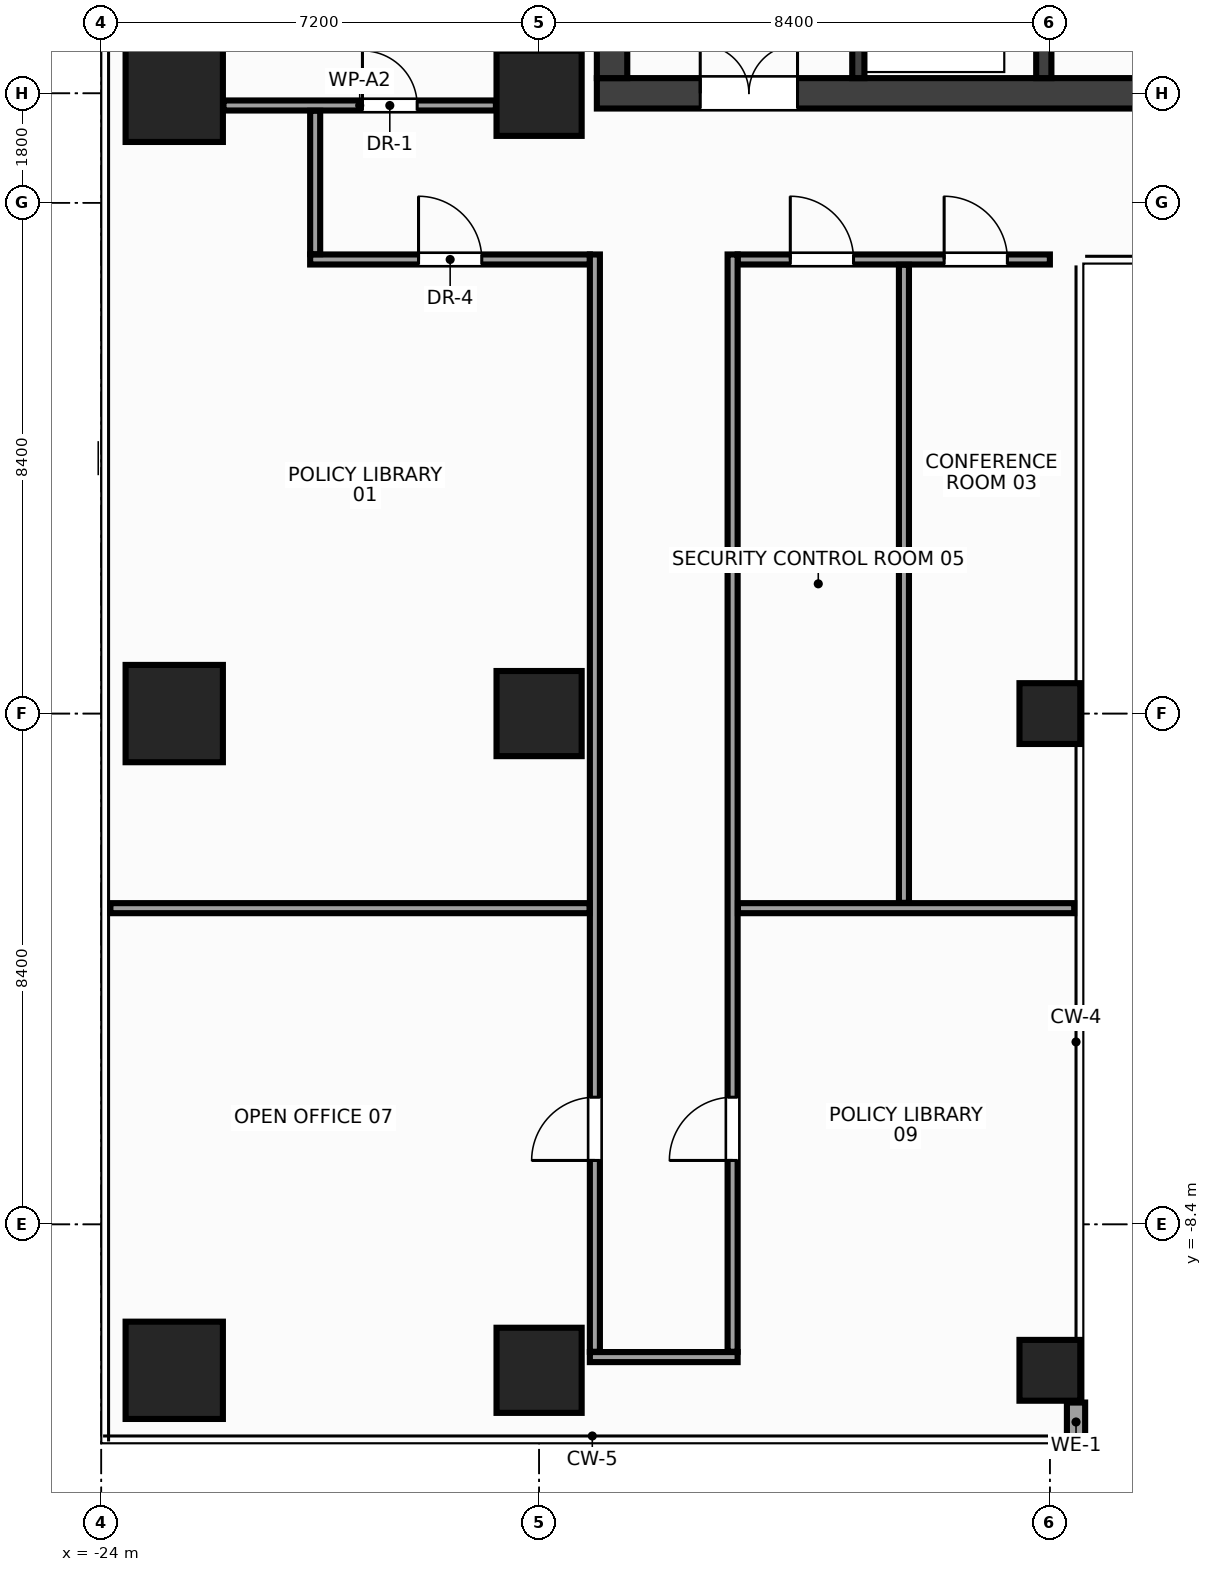
"""IFC4 building model, lengths in metres.
Left out: names, types, materials, properties, quantities, classifications, styles, units other than length and angle.
Written with IfcOpenShell. Run it as: python <this file> out.ifc"""

import sys

from ifc_helpers import new_model, si_unit, direction, frame, frame_2d, origin, origin_2d, place, context, subcontext, project, spatial, rectangle, hollow_rectangle, extrude, source, transform, mapped, element, fill, save


model = new_model("IFC4")
c1 = context("Model", 3, precision=1e-05, world=origin(), true_north=direction((0.0, 1.0)))
c2 = subcontext(c1, "Body", "Model", "MODEL_VIEW")
j1 = project(units=[si_unit("LENGTHUNIT", "METRE"), si_unit("PLANEANGLEUNIT", "RADIAN")], contexts=[c1])
p1 = place(None, origin())
s1 = spatial("IfcSite", under=j1, at=p1, CompositionType="ELEMENT")
p2 = place(p1, origin())
s2 = spatial("IfcBuilding", under=s1, at=p2, CompositionType="ELEMENT")
p3 = place(p2, frame((0.0, 0.0, 218.0)))
s3 = spatial("IfcBuildingStorey", under=s2, at=p3, CompositionType="ELEMENT", Elevation=218.0)
m1 = source(origin(), c2, "Body", "SweptSolid", [
    extrude(rectangle(XDim=31.7, YDim=0.5, at=frame_2d((15.85, 0.0))), origin(), (0.0, 0.0, 1.0), 3.6),
])
p4 = place(p3, frame((-15.85, 10.2, 0.0), z_axis=(0.0, 0.0, 1.0), x_axis=(1.0, 0.0, 0.0)))
e1 = element("IfcWall", 1, at=p4, inside=s3, PredefinedType="SHEAR", context=c2, shape_type="MappedRepresentation", body=[
    mapped(m1, transform((0.0, 0.0, 0.0), x_axis=(1.0, 0.0, 0.0), y_axis=(0.0, 1.0, 0.0), z_axis=(0.0, 0.0, 1.0), scale=1.0)),
])
p5 = place(p4, frame((1.7, 0.0, 0.0)))
e2 = element("IfcOpeningElement", 2, at=p5, cuts=e1, PredefinedType="OPENING", context=c2, shape_type="SweptSolid", body=[
    extrude(rectangle(XDim=1.6, YDim=2.15, at=frame_2d((0.8, 1.075))), frame((0.0, 0.262, 0.0), z_axis=(0.0, -1.0, 0.0), x_axis=(1.0, 0.0, 0.0)), (0.0, 0.0, 1.0), 0.524),
])
p6 = place(p4, frame((28.4, 0.0, 0.0)))
e3 = element("IfcOpeningElement", 3, at=p6, cuts=e1, PredefinedType="OPENING", context=c2, shape_type="SweptSolid", body=[
    extrude(rectangle(XDim=1.6, YDim=2.15, at=frame_2d((0.8, 1.075))), frame((0.0, 0.262, 0.0), z_axis=(0.0, -1.0, 0.0), x_axis=(1.0, 0.0, 0.0)), (0.0, 0.0, 1.0), 0.524),
])
p7 = place(p4, frame((15.1, 0.0, 0.0)))
e4 = element("IfcOpeningElement", 4, at=p7, cuts=e1, PredefinedType="OPENING", context=c2, shape_type="SweptSolid", body=[
    extrude(rectangle(XDim=1.5, YDim=2.2, at=frame_2d((0.75, 1.1))), frame((0.0, 0.262, 0.0), z_axis=(0.0, -1.0, 0.0), x_axis=(1.0, 0.0, 0.0)), (0.0, 0.0, 1.0), 0.524),
])
m2 = source(origin(), c2, "Body", "SweptSolid", [
    extrude(rectangle(XDim=13.1, YDim=0.5, at=frame_2d((6.55, 0.0))), origin(), (0.0, 0.0, 1.0), 3.6),
])
p8 = place(p3, frame((-15.6, 10.45, 0.0), z_axis=(0.0, 0.0, 1.0), x_axis=(0.0, 1.0, 0.0)))
e5 = element("IfcWall", 5, at=p8, inside=s3, PredefinedType="SHEAR", context=c2, shape_type="MappedRepresentation", body=[
    mapped(m2, transform((0.0, 0.0, 0.0), x_axis=(1.0, 0.0, 0.0), y_axis=(0.0, 1.0, 0.0), z_axis=(0.0, 0.0, 1.0), scale=1.0)),
])
m3 = source(origin(), c2, "Body", "SweptSolid", [
    extrude(rectangle(XDim=13.1, YDim=0.25, at=frame_2d((6.55, 0.0))), origin(), (0.0, 0.0, 1.0), 3.6),
])
p9 = place(p3, frame((-8.5, 10.45, 0.0), z_axis=(0.0, 0.0, 1.0), x_axis=(0.0, 1.0, 0.0)))
e6 = element("IfcWall", 6, at=p9, inside=s3, PredefinedType="SHEAR", context=c2, shape_type="MappedRepresentation", body=[
    mapped(m3, transform((0.0, 0.0, 0.0), x_axis=(1.0, 0.0, 0.0), y_axis=(0.0, 1.0, 0.0), z_axis=(0.0, 0.0, 1.0), scale=1.0)),
])
p10 = place(p9, frame((4.22, 0.0, 0.0)))
e7 = element("IfcOpeningElement", 7, at=p10, cuts=e6, PredefinedType="OPENING", context=c2, shape_type="SweptSolid", body=[
    extrude(rectangle(XDim=1.1, YDim=2.15, at=frame_2d((0.55, 1.075))), frame((0.0, 0.137, 0.0), z_axis=(0.0, -1.0, 0.0), x_axis=(1.0, 0.0, 0.0)), (0.0, 0.0, 1.0), 0.274),
])
p11 = place(p9, frame((6.14, 0.0, 0.0)))
e8 = element("IfcOpeningElement", 8, at=p11, cuts=e6, PredefinedType="OPENING", context=c2, shape_type="SweptSolid", body=[
    extrude(rectangle(XDim=1.1, YDim=2.15, at=frame_2d((0.55, 1.075))), frame((0.0, 0.137, 0.0), z_axis=(0.0, -1.0, 0.0), x_axis=(1.0, 0.0, 0.0)), (0.0, 0.0, 1.0), 0.274),
])
p12 = place(p9, frame((8.06, 0.0, 0.0)))
e9 = element("IfcOpeningElement", 9, at=p12, cuts=e6, PredefinedType="OPENING", context=c2, shape_type="SweptSolid", body=[
    extrude(rectangle(XDim=1.1, YDim=2.15, at=frame_2d((0.55, 1.075))), frame((0.0, 0.137, 0.0), z_axis=(0.0, -1.0, 0.0), x_axis=(1.0, 0.0, 0.0)), (0.0, 0.0, 1.0), 0.274),
])
m4 = source(origin(), c2, "Body", "SweptSolid", [
    extrude(rectangle(XDim=3.2, YDim=0.2, at=frame_2d((1.6, 0.0))), origin(), (0.0, 0.0, 1.0), 3.6),
])
p13 = place(p3, frame((-11.55, 10.45, 0.0), z_axis=(0.0, 0.0, 1.0), x_axis=(0.0, 1.0, 0.0)))
e10 = element("IfcWall", 10, at=p13, inside=s3, PredefinedType="SHEAR", context=c2, shape_type="MappedRepresentation", body=[
    mapped(m4, transform((0.0, 0.0, 0.0), x_axis=(1.0, 0.0, 0.0), y_axis=(0.0, 1.0, 0.0), z_axis=(0.0, 0.0, 1.0), scale=1.0)),
])
p14 = place(p13, frame((0.9, 0.0, 0.0)))
e11 = element("IfcOpeningElement", 11, at=p14, cuts=e10, PredefinedType="OPENING", context=c2, shape_type="SweptSolid", body=[
    extrude(rectangle(XDim=1.1, YDim=2.15, at=frame_2d((0.55, 1.075))), frame((0.0, 0.112, 0.0), z_axis=(0.0, -1.0, 0.0), x_axis=(1.0, 0.0, 0.0)), (0.0, 0.0, 1.0), 0.224),
])
m5 = source(origin(), c2, "Body", "SweptSolid", [
    extrude(rectangle(XDim=1.4, YDim=1.4, at=origin_2d()), origin(), (0.0, 0.0, 1.0), 3.6),
])
for number, where, z_axis, x_axis in (
    (12, (-16.8, -10.8, 0.0), (0.0, 0.0, 1.0), (1.0, 0.0, 0.0)),
    (13, (-16.8, 0.0, 0.0), (0.0, 0.0, 1.0), (1.0, 0.0, 0.0)),
    (14, (-16.8, 10.2, 0.0), (0.0, 0.0, 1.0), (1.0, 0.0, 0.0)),
):
    element("IfcColumn", number, at=place(p3, frame(where, z_axis=z_axis, x_axis=x_axis)), inside=s3, PredefinedType="COLUMN", context=c2, shape_type="MappedRepresentation", body=[
        mapped(m5, transform((0.0, 0.0, 0.0), x_axis=(1.0, 0.0, 0.0), y_axis=(0.0, 1.0, 0.0), z_axis=(0.0, 0.0, 1.0), scale=1.0)),
    ])
m6 = source(origin(), c2, "Body", "SweptSolid", [
    extrude(rectangle(XDim=1.6, YDim=1.6, at=origin_2d()), origin(), (0.0, 0.0, 1.0), 3.6),
])
for number, where, z_axis, x_axis in (
    (15, (-22.8, -10.8, 0.0), (0.0, 0.0, 1.0), (1.0, 0.0, 0.0)),
    (16, (-22.8, 0.0, 0.0), (0.0, 0.0, 1.0), (1.0, 0.0, 0.0)),
    (17, (-22.8, 10.2, 0.0), (0.0, 0.0, 1.0), (1.0, 0.0, 0.0)),
):
    element("IfcColumn", number, at=place(p3, frame(where, z_axis=z_axis, x_axis=x_axis)), inside=s3, PredefinedType="COLUMN", context=c2, shape_type="MappedRepresentation", body=[
        mapped(m6, transform((0.0, 0.0, 0.0), x_axis=(1.0, 0.0, 0.0), y_axis=(0.0, 1.0, 0.0), z_axis=(0.0, 0.0, 1.0), scale=1.0)),
    ])
m7 = source(origin(), c2, "Body", "SweptSolid", [
    extrude(hollow_rectangle(XDim=1.0, YDim=1.0, WallThickness=0.045, at=origin_2d()), origin(), (0.0, 0.0, 1.0), 3.6),
])
for number, where, z_axis, x_axis in (
    (18, (-8.4, 0.0, 0.0), (0.0, 0.0, 1.0), (1.0, 0.0, 0.0)),
    (19, (-8.4, -10.8, 0.0), (0.0, 0.0, 1.0), (1.0, 0.0, 0.0)),
):
    element("IfcColumn", number, at=place(p3, frame(where, z_axis=z_axis, x_axis=x_axis)), inside=s3, PredefinedType="COLUMN", context=c2, shape_type="MappedRepresentation", body=[
        mapped(m7, transform((0.0, 0.0, 0.0), x_axis=(1.0, 0.0, 0.0), y_axis=(0.0, 1.0, 0.0), z_axis=(0.0, 0.0, 1.0), scale=1.0)),
    ])
m8 = source(origin(), c2, "Body", "SweptSolid", [
    extrude(rectangle(XDim=0.64, YDim=0.24, at=frame_2d((0.32, 0.0))), origin(), (0.0, 0.0, 1.0), 2.76),
])
p15 = place(p3, frame((-7.97, -11.97, 0.0), z_axis=(0.0, 0.0, 1.0), x_axis=(0.0, 1.0, 0.0)))
e20 = element("IfcWall", 20, at=p15, inside=s3, PredefinedType="STANDARD", context=c2, shape_type="MappedRepresentation", body=[
    mapped(m8, transform((0.0, 0.0, 0.0), x_axis=(1.0, 0.0, 0.0), y_axis=(0.0, 1.0, 0.0), z_axis=(0.0, 0.0, 1.0), scale=1.0)),
])
m9 = source(origin(), c2, "Body", "SweptSolid", [
    extrude(rectangle(XDim=4.48, YDim=0.165, at=frame_2d((2.24, 0.0))), origin(), (0.0, 0.0, 1.0), 2.915),
])
p16 = place(p3, frame((-21.99, 10.0, 0.0), z_axis=(0.0, 0.0, 1.0), x_axis=(1.0, 0.0, 0.0)))
e21 = element("IfcWall", 21, at=p16, inside=s3, PredefinedType="PARTITIONING", context=c2, shape_type="MappedRepresentation", body=[
    mapped(m9, transform((0.0, 0.0, 0.0), x_axis=(1.0, 0.0, 0.0), y_axis=(0.0, 1.0, 0.0), z_axis=(0.0, 0.0, 1.0), scale=1.0)),
])
p17 = place(p16, frame((2.285, 0.0, 0.0)))
e22 = element("IfcOpeningElement", 22, at=p17, cuts=e21, PredefinedType="OPENING", context=c2, shape_type="SweptSolid", body=[
    extrude(rectangle(XDim=0.9, YDim=2.15, at=frame_2d((0.45, 1.075))), frame((0.0, 0.094, 0.0), z_axis=(0.0, -1.0, 0.0), x_axis=(1.0, 0.0, 0.0)), (0.0, 0.0, 1.0), 0.189),
])
m10 = source(origin(), c2, "Body", "SweptSolid", [
    extrude(rectangle(XDim=4.6, YDim=0.165, at=frame_2d((2.3, 0.0))), origin(), (0.0, 0.0, 1.0), 2.765),
])
p18 = place(p3, frame((-20.565, 7.468, 0.0), z_axis=(0.0, 0.0, 1.0), x_axis=(1.0, 0.0, 0.0)))
e23 = element("IfcWall", 23, at=p18, inside=s3, PredefinedType="PARTITIONING", context=c2, shape_type="MappedRepresentation", body=[
    mapped(m10, transform((0.0, 0.0, 0.0), x_axis=(1.0, 0.0, 0.0), y_axis=(0.0, 1.0, 0.0), z_axis=(0.0, 0.0, 1.0), scale=1.0)),
])
p19 = place(p18, frame((1.782, 0.0, 0.0)))
e24 = element("IfcOpeningElement", 24, at=p19, cuts=e23, PredefinedType="OPENING", context=c2, shape_type="SweptSolid", body=[
    extrude(rectangle(XDim=1.04, YDim=2.2, at=frame_2d((0.52, 1.1))), frame((0.0, 0.094, 0.0), z_axis=(0.0, -1.0, 0.0), x_axis=(1.0, 0.0, 0.0)), (0.0, 0.0, 1.0), 0.189),
])
m11 = source(origin(), c2, "Body", "SweptSolid", [
    extrude(rectangle(XDim=5.135, YDim=0.165, at=frame_2d((2.567, 0.0))), origin(), (0.0, 0.0, 1.0), 3.38),
])
p20 = place(p3, frame((-13.535, 7.468, 0.0), z_axis=(0.0, 0.0, 1.0), x_axis=(1.0, 0.0, 0.0)))
e25 = element("IfcWall", 25, at=p20, inside=s3, PredefinedType="PARTITIONING", context=c2, shape_type="MappedRepresentation", body=[
    mapped(m11, transform((0.0, 0.0, 0.0), x_axis=(1.0, 0.0, 0.0), y_axis=(0.0, 1.0, 0.0), z_axis=(0.0, 0.0, 1.0), scale=1.0)),
])
p21 = place(p20, frame((3.396, 0.0, 0.0)))
e26 = element("IfcOpeningElement", 26, at=p21, cuts=e25, PredefinedType="OPENING", context=c2, shape_type="SweptSolid", body=[
    extrude(rectangle(XDim=1.04, YDim=2.2, at=frame_2d((0.52, 1.1))), frame((0.0, 0.094, 0.0), z_axis=(0.0, -1.0, 0.0), x_axis=(1.0, 0.0, 0.0)), (0.0, 0.0, 1.0), 0.189),
])
p22 = place(p20, frame((0.866, 0.0, 0.0)))
e27 = element("IfcOpeningElement", 27, at=p22, cuts=e25, PredefinedType="OPENING", context=c2, shape_type="SweptSolid", body=[
    extrude(rectangle(XDim=1.04, YDim=2.2, at=frame_2d((0.52, 1.1))), frame((0.0, 0.094, 0.0), z_axis=(0.0, -1.0, 0.0), x_axis=(1.0, 0.0, 0.0)), (0.0, 0.0, 1.0), 0.189),
])
m12 = source(origin(), c2, "Body", "SweptSolid", [
    extrude(rectangle(XDim=2.43, YDim=0.165, at=frame_2d((1.215, 0.0))), origin(), (0.0, 0.0, 1.0), 2.915),
])
p23 = place(p3, frame((-15.965, -10.583, 0.0), z_axis=(0.0, 0.0, 1.0), x_axis=(1.0, 0.0, 0.0)))
e28 = element("IfcWall", 28, at=p23, inside=s3, PredefinedType="PARTITIONING", context=c2, shape_type="MappedRepresentation", body=[
    mapped(m12, transform((0.0, 0.0, 0.0), x_axis=(1.0, 0.0, 0.0), y_axis=(0.0, 1.0, 0.0), z_axis=(0.0, 0.0, 1.0), scale=1.0)),
])
m13 = source(origin(), c2, "Body", "SweptSolid", [
    extrude(rectangle(XDim=2.358, YDim=0.165, at=frame_2d((1.179, 0.0))), origin(), (0.0, 0.0, 1.0), 3.38),
])
p24 = place(p3, frame((-20.482, 7.555, 0.0), z_axis=(0.0, 0.0, 1.0), x_axis=(0.0, 1.0, 0.0)))
e29 = element("IfcWall", 29, at=p24, inside=s3, PredefinedType="PARTITIONING", context=c2, shape_type="MappedRepresentation", body=[
    mapped(m13, transform((0.0, 0.0, 0.0), x_axis=(1.0, 0.0, 0.0), y_axis=(0.0, 1.0, 0.0), z_axis=(0.0, 0.0, 1.0), scale=1.0)),
])
m14 = source(origin(), c2, "Body", "SweptSolid", [
    extrude(rectangle(XDim=18.045, YDim=0.165, at=frame_2d((9.022, 0.0))), origin(), (0.0, 0.0, 1.0), 2.915),
])
p25 = place(p3, frame((-15.883, -10.495, 0.0), z_axis=(0.0, 0.0, 1.0), x_axis=(0.0, 1.0, 0.0)))
e30 = element("IfcWall", 30, at=p25, inside=s3, PredefinedType="PARTITIONING", context=c2, shape_type="MappedRepresentation", body=[
    mapped(m14, transform((0.0, 0.0, 0.0), x_axis=(1.0, 0.0, 0.0), y_axis=(0.0, 1.0, 0.0), z_axis=(0.0, 0.0, 1.0), scale=1.0)),
])
p26 = place(p25, frame((3.146, 0.0, 0.0)))
e31 = element("IfcOpeningElement", 31, at=p26, cuts=e30, PredefinedType="OPENING", context=c2, shape_type="SweptSolid", body=[
    extrude(rectangle(XDim=1.04, YDim=2.2, at=frame_2d((0.52, 1.1))), frame((0.0, 0.094, 0.0), z_axis=(0.0, -1.0, 0.0), x_axis=(1.0, 0.0, 0.0)), (0.0, 0.0, 1.0), 0.189),
])
p27 = place(p3, frame((-13.617, -10.495, 0.0), z_axis=(0.0, 0.0, 1.0), x_axis=(0.0, 1.0, 0.0)))
e32 = element("IfcWall", 32, at=p27, inside=s3, PredefinedType="PARTITIONING", context=c2, shape_type="MappedRepresentation", body=[
    mapped(m14, transform((0.0, 0.0, 0.0), x_axis=(1.0, 0.0, 0.0), y_axis=(0.0, 1.0, 0.0), z_axis=(0.0, 0.0, 1.0), scale=1.0)),
])
p28 = place(p27, frame((3.146, 0.0, 0.0)))
e33 = element("IfcOpeningElement", 33, at=p28, cuts=e32, PredefinedType="OPENING", context=c2, shape_type="SweptSolid", body=[
    extrude(rectangle(XDim=1.04, YDim=2.2, at=frame_2d((0.52, 1.1))), frame((0.0, 0.094, 0.0), z_axis=(0.0, -1.0, 0.0), x_axis=(1.0, 0.0, 0.0)), (0.0, 0.0, 1.0), 0.189),
])
m15 = source(origin(), c2, "Body", "SweptSolid", [
    extrude(rectangle(XDim=7.88, YDim=0.165, at=frame_2d((3.94, 0.0))), origin(), (0.0, 0.0, 1.0), 2.765),
])
p29 = place(p3, frame((-23.85, -3.2, 0.0), z_axis=(0.0, 0.0, 1.0), x_axis=(1.0, 0.0, 0.0)))
e34 = element("IfcWall", 34, at=p29, inside=s3, PredefinedType="PARTITIONING", context=c2, shape_type="MappedRepresentation", body=[
    mapped(m15, transform((0.0, 0.0, 0.0), x_axis=(1.0, 0.0, 0.0), y_axis=(0.0, 1.0, 0.0), z_axis=(0.0, 0.0, 1.0), scale=1.0)),
])
m16 = source(origin(), c2, "Body", "SweptSolid", [
    extrude(rectangle(XDim=5.53, YDim=0.165, at=frame_2d((2.765, 0.0))), origin(), (0.0, 0.0, 1.0), 2.765),
])
p30 = place(p3, frame((-13.53, -3.2, 0.0), z_axis=(0.0, 0.0, 1.0), x_axis=(1.0, 0.0, 0.0)))
e35 = element("IfcWall", 35, at=p30, inside=s3, PredefinedType="PARTITIONING", context=c2, shape_type="MappedRepresentation", body=[
    mapped(m16, transform((0.0, 0.0, 0.0), x_axis=(1.0, 0.0, 0.0), y_axis=(0.0, 1.0, 0.0), z_axis=(0.0, 0.0, 1.0), scale=1.0)),
])
m17 = source(origin(), c2, "Body", "SweptSolid", [
    extrude(rectangle(XDim=10.492, YDim=0.165, at=frame_2d((5.246, 0.0))), origin(), (0.0, 0.0, 1.0), 2.915),
])
p31 = place(p3, frame((-10.8, -3.113, 0.0), z_axis=(0.0, 0.0, 1.0), x_axis=(0.0, 1.0, 0.0)))
e36 = element("IfcWall", 36, at=p31, inside=s3, PredefinedType="PARTITIONING", context=c2, shape_type="MappedRepresentation", body=[
    mapped(m17, transform((0.0, 0.0, 0.0), x_axis=(1.0, 0.0, 0.0), y_axis=(0.0, 1.0, 0.0), z_axis=(0.0, 0.0, 1.0), scale=1.0)),
])
m18 = source(origin(), c2, "Body", "SweptSolid", [
    extrude(rectangle(XDim=1.6, YDim=2.15, at=frame_2d((0.8, 1.075))), frame((0.0, 0.025, 0.0), z_axis=(0.0, -1.0, 0.0), x_axis=(1.0, 0.0, 0.0)), (0.0, 0.0, 1.0), 0.05),
])
p32 = place(p5, origin())
e37 = element("IfcDoor", 37, at=p32, inside=s3, OperationType="DOUBLE_DOOR_SINGLE_SWING", PredefinedType="DOOR", context=c2, shape_type="MappedRepresentation", body=[
    mapped(m18, transform((0.0, 0.0, 0.0), x_axis=(1.0, 0.0, 0.0), y_axis=(0.0, 1.0, 0.0), z_axis=(0.0, 0.0, 1.0), scale=1.0)),
])
fill(e2, e37)
m19 = source(origin(), c2, "Body", "SweptSolid", [
    extrude(rectangle(XDim=0.9, YDim=2.15, at=frame_2d((0.45, 1.075))), frame((0.0, 0.025, 0.0), z_axis=(0.0, -1.0, 0.0), x_axis=(1.0, 0.0, 0.0)), (0.0, 0.0, 1.0), 0.05),
])
p33 = place(p17, origin())
e38 = element("IfcDoor", 38, at=p33, inside=s3, OperationType="SINGLE_SWING_LEFT", PredefinedType="DOOR", context=c2, shape_type="MappedRepresentation", body=[
    mapped(m19, transform((0.0, 0.0, 0.0), x_axis=(1.0, 0.0, 0.0), y_axis=(0.0, 1.0, 0.0), z_axis=(0.0, 0.0, 1.0), scale=1.0)),
])
fill(e22, e38)
m20 = source(origin(), c2, "Body", "SweptSolid", [
    extrude(rectangle(XDim=1.04, YDim=2.2, at=frame_2d((0.52, 1.1))), frame((0.0, 0.025, 0.0), z_axis=(0.0, -1.0, 0.0), x_axis=(1.0, 0.0, 0.0)), (0.0, 0.0, 1.0), 0.05),
])
p34 = place(p19, origin())
e39 = element("IfcDoor", 39, at=p34, inside=s3, OperationType="SINGLE_SWING_LEFT", PredefinedType="DOOR", context=c2, shape_type="MappedRepresentation", body=[
    mapped(m20, transform((0.0, 0.0, 0.0), x_axis=(1.0, 0.0, 0.0), y_axis=(0.0, 1.0, 0.0), z_axis=(0.0, 0.0, 1.0), scale=1.0)),
])
fill(e24, e39)
p35 = place(p21, origin())
e40 = element("IfcDoor", 40, at=p35, inside=s3, OperationType="SINGLE_SWING_LEFT", PredefinedType="DOOR", context=c2, shape_type="MappedRepresentation", body=[
    mapped(m20, transform((0.0, 0.0, 0.0), x_axis=(1.0, 0.0, 0.0), y_axis=(0.0, 1.0, 0.0), z_axis=(0.0, 0.0, 1.0), scale=1.0)),
])
fill(e26, e40)
p36 = place(p22, origin())
e41 = element("IfcDoor", 41, at=p36, inside=s3, OperationType="SINGLE_SWING_LEFT", PredefinedType="DOOR", context=c2, shape_type="MappedRepresentation", body=[
    mapped(m20, transform((0.0, 0.0, 0.0), x_axis=(1.0, 0.0, 0.0), y_axis=(0.0, 1.0, 0.0), z_axis=(0.0, 0.0, 1.0), scale=1.0)),
])
fill(e27, e41)
p37 = place(p26, origin())
e42 = element("IfcDoor", 42, at=p37, inside=s3, OperationType="SINGLE_SWING_LEFT", PredefinedType="DOOR", context=c2, shape_type="MappedRepresentation", body=[
    mapped(m20, transform((0.0, 0.0, 0.0), x_axis=(1.0, 0.0, 0.0), y_axis=(0.0, 1.0, 0.0), z_axis=(0.0, 0.0, 1.0), scale=1.0)),
])
fill(e31, e42)
p38 = place(p28, origin())
e43 = element("IfcDoor", 43, at=p38, inside=s3, OperationType="SINGLE_SWING_LEFT", PredefinedType="DOOR", context=c2, shape_type="MappedRepresentation", body=[
    mapped(m20, transform((0.0, 0.0, 0.0), x_axis=(1.0, 0.0, 0.0), y_axis=(0.0, 1.0, 0.0), z_axis=(0.0, 0.0, 1.0), scale=1.0)),
])
fill(e33, e43)
save(model, sys.argv[1])
